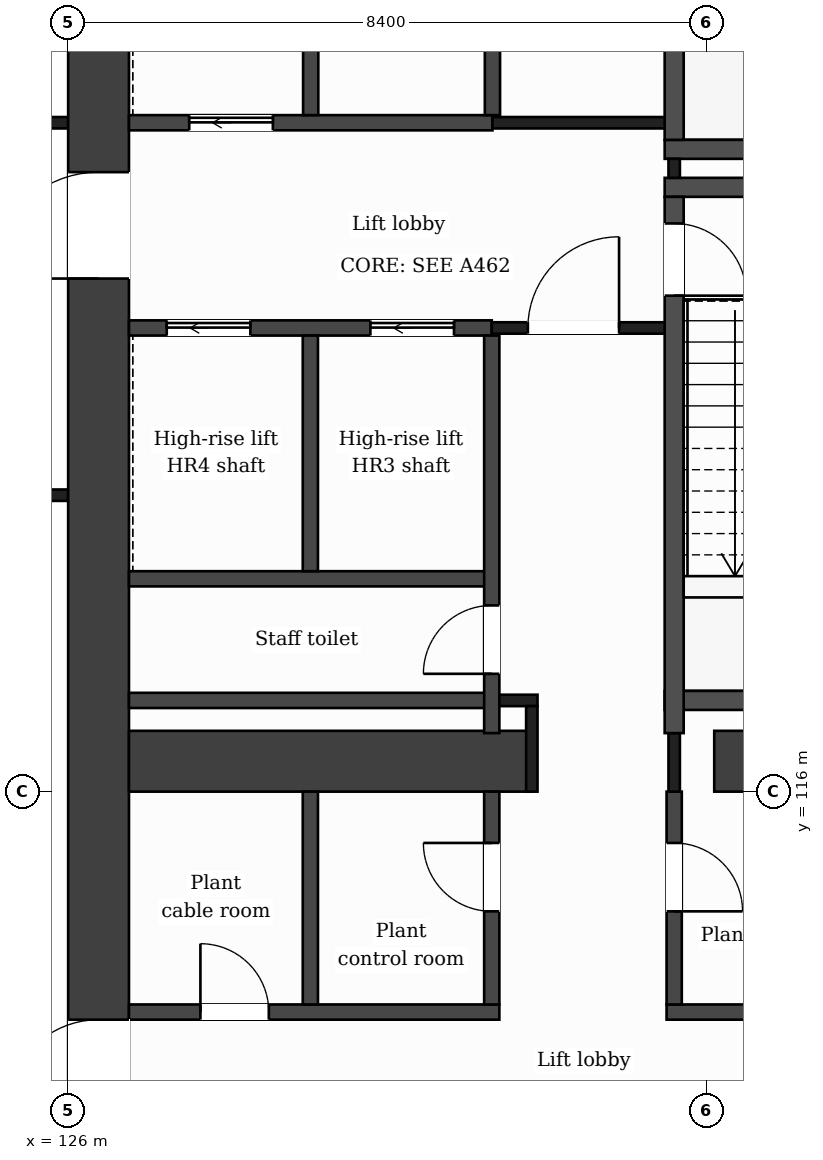
"""IFC4 building model, lengths in metres.
Left out: names, types, materials, properties, quantities, classifications, styles, units other than length and angle.
Written with IfcOpenShell. Run it as: python <this file> out.ifc"""

import sys

from ifc_helpers import new_model, si_unit, direction, frame, frame_2d, origin, place, context, subcontext, project, spatial, rectangle, extrude, element, fill, save


model = new_model("IFC4")
c1 = context("Model", 3, precision=1e-05, world=origin(), true_north=direction((0.0, 1.0)))
c2 = subcontext(c1, "Body", "Model", "MODEL_VIEW")
j1 = project(units=[si_unit("LENGTHUNIT", "METRE"), si_unit("PLANEANGLEUNIT", "RADIAN")], contexts=[c1])
p1 = place(None, origin())
s1 = spatial("IfcSite", under=j1, at=p1, CompositionType="ELEMENT")
p2 = place(p1, origin())
s2 = spatial("IfcBuilding", under=s1, at=p2, CompositionType="ELEMENT")
p3 = place(p2, frame((0.0, 0.0, 254.0)))
s3 = spatial("IfcBuildingStorey", under=s2, at=p3, CompositionType="ELEMENT", Elevation=254.0)
p4 = place(p3, frame((126.4, 110.8, 0.0), z_axis=(0.0, 0.0, 1.0), x_axis=(0.0, 1.0, 0.0)))
e1 = element("IfcWall", 1, at=p4, inside=s3, PredefinedType="SHEAR", context=c2, shape_type="SweptSolid", body=[
    extrude(rectangle(XDim=21.2, YDim=0.8, at=frame_2d((10.6, 0.0))), origin(), (0.0, 0.0, 1.0), 5.0),
])
p5 = place(p4, frame((1.0, 0.0, 0.0)))
e2 = element("IfcOpeningElement", 2, at=p5, cuts=e1, PredefinedType="OPENING", context=c2, shape_type="SweptSolid", body=[
    extrude(rectangle(XDim=1.2, YDim=2.1, at=frame_2d((0.6, 1.05))), frame((0.0, 0.41, 0.0), z_axis=(0.0, -1.0, 0.0), x_axis=(1.0, 0.0, 0.0)), (0.0, 0.0, 1.0), 0.82),
])
p6 = place(p4, frame((11.95, 0.0, 0.0)))
e3 = element("IfcOpeningElement", 3, at=p6, cuts=e1, PredefinedType="OPENING", context=c2, shape_type="SweptSolid", body=[
    extrude(rectangle(XDim=1.4, YDim=2.1, at=frame_2d((0.7, 1.05))), frame((0.0, 0.41, 0.0), z_axis=(0.0, -1.0, 0.0), x_axis=(1.0, 0.0, 0.0)), (0.0, 0.0, 1.0), 0.82),
])
p7 = place(p3, frame((126.8, 116.4, 0.0), z_axis=(0.0, 0.0, 1.0), x_axis=(1.0, 0.0, 0.0)))
e4 = element("IfcWall", 4, at=p7, inside=s3, PredefinedType="SHEAR", context=c2, shape_type="SweptSolid", body=[
    extrude(rectangle(XDim=5.3, YDim=0.8, at=frame_2d((2.65, 0.0))), origin(), (0.0, 0.0, 1.0), 5.0),
])
p8 = place(p3, frame((134.5, 116.4, 0.0), z_axis=(0.0, 0.0, 1.0), x_axis=(1.0, 0.0, 0.0)))
e5 = element("IfcWall", 5, at=p8, inside=s3, PredefinedType="SHEAR", context=c2, shape_type="SweptSolid", body=[
    extrude(rectangle(XDim=5.077, YDim=0.8, at=frame_2d((2.539, 0.0))), origin(), (0.0, 0.0, 1.0), 5.0),
])
p9 = place(p3, frame((126.8, 113.1, 0.0), z_axis=(0.0, 0.0, 1.0), x_axis=(1.0, 0.0, 0.0)))
e6 = element("IfcWall", 6, at=p9, inside=s3, PredefinedType="PARTITIONING", context=c2, shape_type="SweptSolid", body=[
    extrude(rectangle(XDim=4.873, YDim=0.2, at=frame_2d((2.437, 0.0))), origin(), (0.0, 0.0, 1.0), 4.68),
])
p10 = place(p9, frame((0.94, 0.0, 0.0)))
e7 = element("IfcOpeningElement", 7, at=p10, cuts=e6, PredefinedType="OPENING", context=c2, shape_type="SweptSolid", body=[
    extrude(rectangle(XDim=0.9, YDim=2.1, at=frame_2d((0.45, 1.05))), frame((0.0, 0.11, 0.0), z_axis=(0.0, -1.0, 0.0), x_axis=(1.0, 0.0, 0.0)), (0.0, 0.0, 1.0), 0.22),
])
p11 = place(p3, frame((133.873, 113.1, 0.0), z_axis=(0.0, 0.0, 1.0), x_axis=(1.0, 0.0, 0.0)))
e8 = element("IfcWall", 8, at=p11, inside=s3, PredefinedType="PARTITIONING", context=c2, shape_type="SweptSolid", body=[
    extrude(rectangle(XDim=6.117, YDim=0.2, at=frame_2d((3.059, 0.0))), origin(), (0.0, 0.0, 1.0), 4.68),
])
p12 = place(p11, frame((3.73, 0.0, 0.0)))
e9 = element("IfcOpeningElement", 9, at=p12, cuts=e8, PredefinedType="OPENING", context=c2, shape_type="SweptSolid", body=[
    extrude(rectangle(XDim=0.9, YDim=2.1, at=frame_2d((0.45, 1.05))), frame((0.0, 0.11, 0.0), z_axis=(0.0, -1.0, 0.0), x_axis=(1.0, 0.0, 0.0)), (0.0, 0.0, 1.0), 0.22),
])
p13 = place(p3, frame((126.8, 117.2, 0.0), z_axis=(0.0, 0.0, 1.0), x_axis=(1.0, 0.0, 0.0)))
e10 = element("IfcWall", 10, at=p13, inside=s3, PredefinedType="PARTITIONING", context=c2, shape_type="SweptSolid", body=[
    extrude(rectangle(XDim=4.773, YDim=0.2, at=frame_2d((2.386, 0.0))), origin(), (0.0, 0.0, 1.0), 4.68),
])
p14 = place(p3, frame((131.573, 117.2, 0.0), z_axis=(0.0, 0.0, 1.0), x_axis=(1.0, 0.0, 0.0)))
e11 = element("IfcWall", 11, at=p14, inside=s3, PredefinedType="PARTITIONING", context=c2, shape_type="SweptSolid", body=[
    extrude(rectangle(XDim=0.602, YDim=0.15, at=frame_2d((0.301, 0.0))), origin(), (0.0, 0.0, 1.0), 4.68),
])
p15 = place(p3, frame((133.848, 117.2, 0.0), z_axis=(0.0, 0.0, 1.0), x_axis=(1.0, 0.0, 0.0)))
e12 = element("IfcWall", 12, at=p15, inside=s3, PredefinedType="PARTITIONING", context=c2, shape_type="SweptSolid", body=[
    extrude(rectangle(XDim=3.4, YDim=0.25, at=frame_2d((1.7, 0.0))), origin(), (0.0, 0.0, 1.0), 4.68),
])
p16 = place(p3, frame((126.8, 118.8, 0.0), z_axis=(0.0, 0.0, 1.0), x_axis=(1.0, 0.0, 0.0)))
e13 = element("IfcWall", 13, at=p16, inside=s3, PredefinedType="PARTITIONING", context=c2, shape_type="SweptSolid", body=[
    extrude(rectangle(XDim=4.773, YDim=0.2, at=frame_2d((2.386, 0.0))), origin(), (0.0, 0.0, 1.0), 4.68),
])
p17 = place(p3, frame((100.8, 119.9, 0.0), z_axis=(0.0, 0.0, 1.0), x_axis=(1.0, 0.0, 0.0)))
e14 = element("IfcWall", 14, at=p17, inside=s3, PredefinedType="PARTITIONING", context=c2, shape_type="SweptSolid", body=[
    extrude(rectangle(XDim=25.2, YDim=0.15, at=frame_2d((12.6, 0.0))), origin(), (0.0, 0.0, 1.0), 4.68),
])
p18 = place(p17, frame((3.6, 0.0, 0.0)))
e15 = element("IfcOpeningElement", 15, at=p18, cuts=e14, PredefinedType="OPENING", context=c2, shape_type="SweptSolid", body=[
    extrude(rectangle(XDim=1.2, YDim=2.1, at=frame_2d((0.6, 1.05))), frame((0.0, 0.085, 0.0), z_axis=(0.0, -1.0, 0.0), x_axis=(1.0, 0.0, 0.0)), (0.0, 0.0, 1.0), 0.17),
])
p19 = place(p17, frame((12.0, 0.0, 0.0)))
e16 = element("IfcOpeningElement", 16, at=p19, cuts=e14, PredefinedType="OPENING", context=c2, shape_type="SweptSolid", body=[
    extrude(rectangle(XDim=1.2, YDim=2.1, at=frame_2d((0.6, 1.05))), frame((0.0, 0.085, 0.0), z_axis=(0.0, -1.0, 0.0), x_axis=(1.0, 0.0, 0.0)), (0.0, 0.0, 1.0), 0.17),
])
p20 = place(p17, frame((20.4, 0.0, 0.0)))
e17 = element("IfcOpeningElement", 17, at=p20, cuts=e14, PredefinedType="OPENING", context=c2, shape_type="SweptSolid", body=[
    extrude(rectangle(XDim=1.2, YDim=2.1, at=frame_2d((0.6, 1.05))), frame((0.0, 0.085, 0.0), z_axis=(0.0, -1.0, 0.0), x_axis=(1.0, 0.0, 0.0)), (0.0, 0.0, 1.0), 0.17),
])
p21 = place(p3, frame((126.8, 122.1, 0.0), z_axis=(0.0, 0.0, 1.0), x_axis=(1.0, 0.0, 0.0)))
e18 = element("IfcWall", 18, at=p21, inside=s3, PredefinedType="PARTITIONING", context=c2, shape_type="SweptSolid", body=[
    extrude(rectangle(XDim=4.773, YDim=0.2, at=frame_2d((2.386, 0.0))), origin(), (0.0, 0.0, 1.0), 4.68),
])
p22 = place(p21, frame((3.176, 0.0, 0.0)))
e19 = element("IfcOpeningElement", 19, at=p22, cuts=e18, PredefinedType="OPENING", context=c2, shape_type="SweptSolid", body=[
    extrude(rectangle(XDim=1.1, YDim=2.1, at=frame_2d((0.55, 1.05))), frame((0.0, 0.11, 0.0), z_axis=(0.0, -1.0, 0.0), x_axis=(1.0, 0.0, 0.0)), (0.0, 0.0, 1.0), 0.22),
])
p23 = place(p21, frame((0.497, 0.0, 0.0)))
e20 = element("IfcOpeningElement", 20, at=p23, cuts=e18, PredefinedType="OPENING", context=c2, shape_type="SweptSolid", body=[
    extrude(rectangle(XDim=1.1, YDim=2.1, at=frame_2d((0.55, 1.05))), frame((0.0, 0.11, 0.0), z_axis=(0.0, -1.0, 0.0), x_axis=(1.0, 0.0, 0.0)), (0.0, 0.0, 1.0), 0.22),
])
p24 = place(p3, frame((131.573, 122.1, 0.0), z_axis=(0.0, 0.0, 1.0), x_axis=(1.0, 0.0, 0.0)))
e21 = element("IfcWall", 21, at=p24, inside=s3, PredefinedType="PARTITIONING", context=c2, shape_type="SweptSolid", body=[
    extrude(rectangle(XDim=2.4, YDim=0.15, at=frame_2d((1.2, 0.0))), origin(), (0.0, 0.0, 1.0), 4.68),
])
p25 = place(p24, frame((0.475, 0.0, 0.0)))
e22 = element("IfcOpeningElement", 22, at=p25, cuts=e21, PredefinedType="OPENING", context=c2, shape_type="SweptSolid", body=[
    extrude(rectangle(XDim=1.2, YDim=2.1, at=frame_2d((0.6, 1.05))), frame((0.0, 0.085, 0.0), z_axis=(0.0, -1.0, 0.0), x_axis=(1.0, 0.0, 0.0)), (0.0, 0.0, 1.0), 0.17),
])
for number, where, z_axis, x_axis in (
    (23, (133.848, 123.95, 0.0), (0.0, 0.0, 1.0), (1.0, 0.0, 0.0)),
    (24, (133.848, 124.45, 0.0), (0.0, 0.0, 1.0), (1.0, 0.0, 0.0)),
):
    element("IfcWall", number, at=place(p3, frame(where, z_axis=z_axis, x_axis=x_axis)), inside=s3, PredefinedType="PARTITIONING", context=c2, shape_type="SweptSolid", body=[
        extrude(rectangle(XDim=3.4, YDim=0.25, at=frame_2d((1.7, 0.0))), origin(), (0.0, 0.0, 1.0), 4.68),
    ])
p26 = place(p3, frame((126.8, 124.8, 0.0), z_axis=(0.0, 0.0, 1.0), x_axis=(1.0, 0.0, 0.0)))
e25 = element("IfcWall", 25, at=p26, inside=s3, PredefinedType="PARTITIONING", context=c2, shape_type="SweptSolid", body=[
    extrude(rectangle(XDim=4.782, YDim=0.2, at=frame_2d((2.391, 0.0))), origin(), (0.0, 0.0, 1.0), 4.68),
])
p27 = place(p26, frame((0.793, 0.0, 0.0)))
e26 = element("IfcOpeningElement", 26, at=p27, cuts=e25, PredefinedType="OPENING", context=c2, shape_type="SweptSolid", body=[
    extrude(rectangle(XDim=1.1, YDim=2.1, at=frame_2d((0.55, 1.05))), frame((0.0, 0.11, 0.0), z_axis=(0.0, -1.0, 0.0), x_axis=(1.0, 0.0, 0.0)), (0.0, 0.0, 1.0), 0.22),
])
p28 = place(p3, frame((131.582, 124.8, 0.0), z_axis=(0.0, 0.0, 1.0), x_axis=(1.0, 0.0, 0.0)))
e27 = element("IfcWall", 27, at=p28, inside=s3, PredefinedType="PARTITIONING", context=c2, shape_type="SweptSolid", body=[
    extrude(rectangle(XDim=2.516, YDim=0.15, at=frame_2d((1.258, 0.0))), origin(), (0.0, 0.0, 1.0), 4.68),
])
p29 = place(p3, frame((100.8, 124.8, 0.0), z_axis=(0.0, 0.0, 1.0), x_axis=(1.0, 0.0, 0.0)))
e28 = element("IfcWall", 28, at=p29, inside=s3, PredefinedType="PARTITIONING", context=c2, shape_type="SweptSolid", body=[
    extrude(rectangle(XDim=25.2, YDim=0.15, at=frame_2d((12.6, 0.0))), origin(), (0.0, 0.0, 1.0), 4.68),
])
p30 = place(p29, frame((3.6, 0.0, 0.0)))
e29 = element("IfcOpeningElement", 29, at=p30, cuts=e28, PredefinedType="OPENING", context=c2, shape_type="SweptSolid", body=[
    extrude(rectangle(XDim=1.2, YDim=2.1, at=frame_2d((0.6, 1.05))), frame((0.0, 0.085, 0.0), z_axis=(0.0, -1.0, 0.0), x_axis=(1.0, 0.0, 0.0)), (0.0, 0.0, 1.0), 0.17),
])
p31 = place(p29, frame((12.0, 0.0, 0.0)))
e30 = element("IfcOpeningElement", 30, at=p31, cuts=e28, PredefinedType="OPENING", context=c2, shape_type="SweptSolid", body=[
    extrude(rectangle(XDim=1.2, YDim=2.1, at=frame_2d((0.6, 1.05))), frame((0.0, 0.085, 0.0), z_axis=(0.0, -1.0, 0.0), x_axis=(1.0, 0.0, 0.0)), (0.0, 0.0, 1.0), 0.17),
])
p32 = place(p29, frame((20.4, 0.0, 0.0)))
e31 = element("IfcOpeningElement", 31, at=p32, cuts=e28, PredefinedType="OPENING", context=c2, shape_type="SweptSolid", body=[
    extrude(rectangle(XDim=1.2, YDim=2.1, at=frame_2d((0.6, 1.05))), frame((0.0, 0.085, 0.0), z_axis=(0.0, -1.0, 0.0), x_axis=(1.0, 0.0, 0.0)), (0.0, 0.0, 1.0), 0.17),
])
p33 = place(p3, frame((129.187, 113.2, 0.0), z_axis=(0.0, 0.0, 1.0), x_axis=(0.0, 1.0, 0.0)))
e32 = element("IfcWall", 32, at=p33, inside=s3, PredefinedType="PARTITIONING", context=c2, shape_type="SweptSolid", body=[
    extrude(rectangle(XDim=2.8, YDim=0.2, at=frame_2d((1.4, 0.0))), origin(), (0.0, 0.0, 1.0), 4.68),
])
for number, where, z_axis, x_axis in (
    (33, (129.187, 118.9, 0.0), (0.0, 0.0, 1.0), (0.0, 1.0, 0.0)),
    (34, (129.191, 124.9, 0.0), (0.0, 0.0, 1.0), (0.0, 1.0, 0.0)),
):
    element("IfcWall", number, at=place(p3, frame(where, z_axis=z_axis, x_axis=x_axis)), inside=s3, PredefinedType="PARTITIONING", context=c2, shape_type="SweptSolid", body=[
        extrude(rectangle(XDim=3.1, YDim=0.2, at=frame_2d((1.55, 0.0))), origin(), (0.0, 0.0, 1.0), 4.68),
    ])
p34 = place(p3, frame((131.573, 113.2, 0.0), z_axis=(0.0, 0.0, 1.0), x_axis=(0.0, 1.0, 0.0)))
e35 = element("IfcWall", 35, at=p34, inside=s3, PredefinedType="PARTITIONING", context=c2, shape_type="SweptSolid", body=[
    extrude(rectangle(XDim=2.8, YDim=0.2, at=frame_2d((1.4, 0.0))), origin(), (0.0, 0.0, 1.0), 4.68),
])
p35 = place(p34, frame((1.225, 0.0, 0.0)))
e36 = element("IfcOpeningElement", 36, at=p35, cuts=e35, PredefinedType="OPENING", context=c2, shape_type="SweptSolid", body=[
    extrude(rectangle(XDim=0.9, YDim=2.1, at=frame_2d((0.45, 1.05))), frame((0.0, 0.11, 0.0), z_axis=(0.0, -1.0, 0.0), x_axis=(1.0, 0.0, 0.0)), (0.0, 0.0, 1.0), 0.22),
])
p36 = place(p3, frame((131.573, 116.77, 0.0), z_axis=(0.0, 0.0, 1.0), x_axis=(0.0, 1.0, 0.0)))
e37 = element("IfcWall", 37, at=p36, inside=s3, PredefinedType="PARTITIONING", context=c2, shape_type="SweptSolid", body=[
    extrude(rectangle(XDim=5.23, YDim=0.2, at=frame_2d((2.615, 0.0))), origin(), (0.0, 0.0, 1.0), 4.68),
])
p37 = place(p36, frame((0.78, 0.0, 0.0)))
e38 = element("IfcOpeningElement", 38, at=p37, cuts=e37, PredefinedType="OPENING", context=c2, shape_type="SweptSolid", body=[
    extrude(rectangle(XDim=0.9, YDim=2.1, at=frame_2d((0.45, 1.05))), frame((0.0, 0.11, 0.0), z_axis=(0.0, -1.0, 0.0), x_axis=(1.0, 0.0, 0.0)), (0.0, 0.0, 1.0), 0.22),
])
p38 = place(p3, frame((131.582, 124.9, 0.0), z_axis=(0.0, 0.0, 1.0), x_axis=(0.0, 1.0, 0.0)))
e39 = element("IfcWall", 39, at=p38, inside=s3, PredefinedType="PARTITIONING", context=c2, shape_type="SweptSolid", body=[
    extrude(rectangle(XDim=3.1, YDim=0.2, at=frame_2d((1.55, 0.0))), origin(), (0.0, 0.0, 1.0), 4.68),
])
p39 = place(p3, frame((132.1, 116.0, 0.0), z_axis=(0.0, 0.0, 1.0), x_axis=(0.0, 1.0, 0.0)))
e40 = element("IfcWall", 40, at=p39, inside=s3, PredefinedType="PARTITIONING", context=c2, shape_type="SweptSolid", body=[
    extrude(rectangle(XDim=1.125, YDim=0.15, at=frame_2d((0.562, 0.0))), origin(), (0.0, 0.0, 1.0), 4.68),
])
p40 = place(p3, frame((133.973, 113.2, 0.0), z_axis=(0.0, 0.0, 1.0), x_axis=(0.0, 1.0, 0.0)))
e41 = element("IfcWall", 41, at=p40, inside=s3, PredefinedType="PARTITIONING", context=c2, shape_type="SweptSolid", body=[
    extrude(rectangle(XDim=2.8, YDim=0.2, at=frame_2d((1.4, 0.0))), origin(), (0.0, 0.0, 1.0), 4.68),
])
p41 = place(p40, frame((1.225, 0.0, 0.0)))
e42 = element("IfcOpeningElement", 42, at=p41, cuts=e41, PredefinedType="OPENING", context=c2, shape_type="SweptSolid", body=[
    extrude(rectangle(XDim=0.9, YDim=2.1, at=frame_2d((0.45, 1.05))), frame((0.0, 0.11, 0.0), z_axis=(0.0, -1.0, 0.0), x_axis=(1.0, 0.0, 0.0)), (0.0, 0.0, 1.0), 0.22),
])
p42 = place(p3, frame((133.973, 116.0, 0.0), z_axis=(0.0, 0.0, 1.0), x_axis=(0.0, 1.0, 0.0)))
e43 = element("IfcWall", 43, at=p42, inside=s3, PredefinedType="PARTITIONING", context=c2, shape_type="SweptSolid", body=[
    extrude(rectangle(XDim=0.77, YDim=0.15, at=frame_2d((0.385, 0.0))), origin(), (0.0, 0.0, 1.0), 4.68),
])
p43 = place(p3, frame((133.973, 124.075, 0.0), z_axis=(0.0, 0.0, 1.0), x_axis=(0.0, 1.0, 0.0)))
e44 = element("IfcWall", 44, at=p43, inside=s3, PredefinedType="PARTITIONING", context=c2, shape_type="SweptSolid", body=[
    extrude(rectangle(XDim=0.25, YDim=0.15, at=frame_2d((0.125, 0.0))), origin(), (0.0, 0.0, 1.0), 4.68),
])
p44 = place(p3, frame((133.973, 116.77, 0.0), z_axis=(0.0, 0.0, 1.0), x_axis=(0.0, 1.0, 0.0)))
e45 = element("IfcWall", 45, at=p44, inside=s3, PredefinedType="PARTITIONING", context=c2, shape_type="SweptSolid", body=[
    extrude(rectangle(XDim=7.055, YDim=0.25, at=frame_2d((3.527, 0.0))), origin(), (0.0, 0.0, 1.0), 4.68),
])
p45 = place(p44, frame((5.755, 0.0, 0.0)))
e46 = element("IfcOpeningElement", 46, at=p45, cuts=e45, PredefinedType="OPENING", context=c2, shape_type="SweptSolid", body=[
    extrude(rectangle(XDim=0.95, YDim=2.1, at=frame_2d((0.475, 1.05))), frame((0.0, 0.135, 0.0), z_axis=(0.0, -1.0, 0.0), x_axis=(1.0, 0.0, 0.0)), (0.0, 0.0, 1.0), 0.27),
])
p46 = place(p3, frame((133.973, 124.575, 0.0), z_axis=(0.0, 0.0, 1.0), x_axis=(0.0, 1.0, 0.0)))
e47 = element("IfcWall", 47, at=p46, inside=s3, PredefinedType="PARTITIONING", context=c2, shape_type="SweptSolid", body=[
    extrude(rectangle(XDim=7.055, YDim=0.25, at=frame_2d((3.527, 0.0))), origin(), (0.0, 0.0, 1.0), 4.68),
])
p47 = place(p46, frame((5.325, 0.0, 0.0)))
e48 = element("IfcOpeningElement", 48, at=p47, cuts=e47, PredefinedType="OPENING", context=c2, shape_type="SweptSolid", body=[
    extrude(rectangle(XDim=1.0, YDim=2.1, at=frame_2d((0.5, 1.05))), frame((0.0, 0.135, 0.0), z_axis=(0.0, -1.0, 0.0), x_axis=(1.0, 0.0, 0.0)), (0.0, 0.0, 1.0), 0.27),
])
p48 = place(p25, origin())
e49 = element("IfcDoor", 49, at=p48, inside=s3, OperationType="SINGLE_SWING_RIGHT", PredefinedType="DOOR", context=c2, shape_type="SweptSolid", body=[
    extrude(rectangle(XDim=1.2, YDim=2.1, at=frame_2d((0.6, 1.05))), frame((0.0, 0.025, 0.0), z_axis=(0.0, -1.0, 0.0), x_axis=(1.0, 0.0, 0.0)), (0.0, 0.0, 1.0), 0.05),
])
fill(e22, e49)
p49 = place(p22, origin())
e50 = element("IfcDoor", 50, at=p49, inside=s3, OperationType="SLIDING_TO_LEFT", PredefinedType="DOOR", context=c2, shape_type="SweptSolid", body=[
    extrude(rectangle(XDim=1.1, YDim=2.1, at=frame_2d((0.55, 1.05))), frame((0.0, 0.025, 0.0), z_axis=(0.0, -1.0, 0.0), x_axis=(1.0, 0.0, 0.0)), (0.0, 0.0, 1.0), 0.05),
])
fill(e19, e50)
p50 = place(p23, origin())
e51 = element("IfcDoor", 51, at=p50, inside=s3, OperationType="SLIDING_TO_LEFT", PredefinedType="DOOR", context=c2, shape_type="SweptSolid", body=[
    extrude(rectangle(XDim=1.1, YDim=2.1, at=frame_2d((0.55, 1.05))), frame((0.0, 0.025, 0.0), z_axis=(0.0, -1.0, 0.0), x_axis=(1.0, 0.0, 0.0)), (0.0, 0.0, 1.0), 0.05),
])
fill(e20, e51)
p51 = place(p27, origin())
e52 = element("IfcDoor", 52, at=p51, inside=s3, OperationType="SLIDING_TO_LEFT", PredefinedType="DOOR", context=c2, shape_type="SweptSolid", body=[
    extrude(rectangle(XDim=1.1, YDim=2.1, at=frame_2d((0.55, 1.05))), frame((0.0, 0.025, 0.0), z_axis=(0.0, -1.0, 0.0), x_axis=(1.0, 0.0, 0.0)), (0.0, 0.0, 1.0), 0.05),
])
fill(e26, e52)
p52 = place(p45, origin())
e53 = element("IfcDoor", 53, at=p52, inside=s3, OperationType="SINGLE_SWING_LEFT", PredefinedType="DOOR", context=c2, shape_type="SweptSolid", body=[
    extrude(rectangle(XDim=0.95, YDim=2.1, at=frame_2d((0.475, 1.05))), frame((0.0, 0.025, 0.0), z_axis=(0.0, -1.0, 0.0), x_axis=(1.0, 0.0, 0.0)), (0.0, 0.0, 1.0), 0.05),
])
fill(e46, e53)
p53 = place(p37, origin())
e54 = element("IfcDoor", 54, at=p53, inside=s3, OperationType="SINGLE_SWING_LEFT", PredefinedType="DOOR", context=c2, shape_type="SweptSolid", body=[
    extrude(rectangle(XDim=0.9, YDim=2.1, at=frame_2d((0.45, 1.05))), frame((0.0, 0.025, 0.0), z_axis=(0.0, -1.0, 0.0), x_axis=(1.0, 0.0, 0.0)), (0.0, 0.0, 1.0), 0.05),
])
fill(e38, e54)
p54 = place(p41, origin())
e55 = element("IfcDoor", 55, at=p54, inside=s3, OperationType="SINGLE_SWING_LEFT", PredefinedType="DOOR", context=c2, shape_type="SweptSolid", body=[
    extrude(rectangle(XDim=0.9, YDim=2.1, at=frame_2d((0.45, 1.05))), frame((0.0, 0.025, 0.0), z_axis=(0.0, -1.0, 0.0), x_axis=(1.0, 0.0, 0.0)), (0.0, 0.0, 1.0), 0.05),
])
fill(e42, e55)
p55 = place(p35, origin())
e56 = element("IfcDoor", 56, at=p55, inside=s3, OperationType="SINGLE_SWING_RIGHT", PredefinedType="DOOR", context=c2, shape_type="SweptSolid", body=[
    extrude(rectangle(XDim=0.9, YDim=2.1, at=frame_2d((0.45, 1.05))), frame((0.0, 0.025, 0.0), z_axis=(0.0, -1.0, 0.0), x_axis=(1.0, 0.0, 0.0)), (0.0, 0.0, 1.0), 0.05),
])
fill(e36, e56)
p56 = place(p10, origin())
e57 = element("IfcDoor", 57, at=p56, inside=s3, OperationType="SINGLE_SWING_LEFT", PredefinedType="DOOR", context=c2, shape_type="SweptSolid", body=[
    extrude(rectangle(XDim=0.9, YDim=2.1, at=frame_2d((0.45, 1.05))), frame((0.0, 0.025, 0.0), z_axis=(0.0, -1.0, 0.0), x_axis=(1.0, 0.0, 0.0)), (0.0, 0.0, 1.0), 0.05),
])
fill(e7, e57)
p57 = place(p5, origin())
e58 = element("IfcDoor", 58, at=p57, inside=s3, OperationType="SINGLE_SWING_LEFT", PredefinedType="DOOR", context=c2, shape_type="SweptSolid", body=[
    extrude(rectangle(XDim=1.2, YDim=2.1, at=frame_2d((0.6, 1.05))), frame((0.0, 0.025, 0.0), z_axis=(0.0, -1.0, 0.0), x_axis=(1.0, 0.0, 0.0)), (0.0, 0.0, 1.0), 0.05),
])
fill(e2, e58)
p58 = place(p6, origin())
e59 = element("IfcDoor", 59, at=p58, inside=s3, OperationType="SINGLE_SWING_LEFT", PredefinedType="DOOR", context=c2, shape_type="SweptSolid", body=[
    extrude(rectangle(XDim=1.4, YDim=2.1, at=frame_2d((0.7, 1.05))), frame((0.0, 0.025, 0.0), z_axis=(0.0, -1.0, 0.0), x_axis=(1.0, 0.0, 0.0)), (0.0, 0.0, 1.0), 0.05),
])
fill(e3, e59)
save(model, sys.argv[1])
